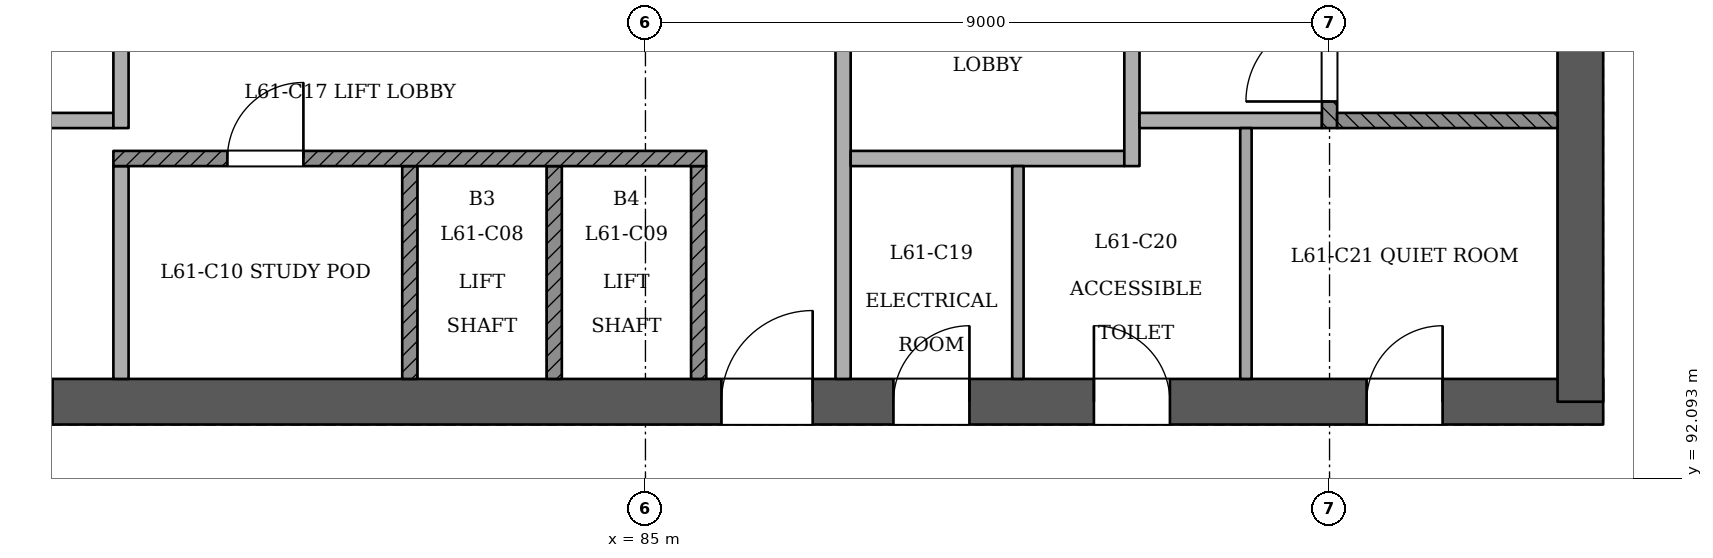
"""IFC4 building model, lengths in metres.
Left out: names, types, materials, properties, quantities, classifications, styles, units other than length and angle.
Written with IfcOpenShell. Run it as: python <this file> out.ifc"""

import sys

from ifc_helpers import new_model, si_unit, direction, frame, frame_2d, origin, place, context, subcontext, project, spatial, rectangle, extrude, element, fill, save


model = new_model("IFC4")
c1 = context("Model", 3, precision=1e-05, world=origin(), true_north=direction((0.0, 1.0)))
c2 = subcontext(c1, "Body", "Model", "MODEL_VIEW")
j1 = project(units=[si_unit("LENGTHUNIT", "METRE"), si_unit("PLANEANGLEUNIT", "RADIAN")], contexts=[c1])
p1 = place(None, origin())
s1 = spatial("IfcSite", under=j1, at=p1, CompositionType="ELEMENT")
p2 = place(p1, origin())
s2 = spatial("IfcBuilding", under=s1, at=p2, CompositionType="ELEMENT")
p3 = place(p2, frame((0.0, 0.0, 239.2)))
s3 = spatial("IfcBuildingStorey", under=s2, at=p3, CompositionType="ELEMENT", Elevation=239.2)
p4 = place(p3, frame((72.7, 93.1, 0.0), z_axis=(0.0, 0.0, 1.0), x_axis=(1.0, 0.0, 0.0)))
e1 = element("IfcWall", 1, at=p4, inside=s3, PredefinedType="SHEAR", context=c2, shape_type="SweptSolid", body=[
    extrude(rectangle(XDim=24.9, YDim=0.6, at=frame_2d((12.45, 0.0))), origin(), (0.0, 0.0, 1.0), 3.6),
])
p5 = place(p4, frame((1.1, 0.0, 0.0)))
e2 = element("IfcOpeningElement", 2, at=p5, cuts=e1, PredefinedType="OPENING", context=c2, shape_type="SweptSolid", body=[
    extrude(rectangle(XDim=1.2, YDim=2.1, at=frame_2d((0.6, 1.05))), frame((0.0, 0.311, 0.0), z_axis=(0.0, -1.0, 0.0), x_axis=(1.0, 0.0, 0.0)), (0.0, 0.0, 1.0), 0.621),
])
p6 = place(p4, frame((3.3, 0.0, 0.0)))
e3 = element("IfcOpeningElement", 3, at=p6, cuts=e1, PredefinedType="OPENING", context=c2, shape_type="SweptSolid", body=[
    extrude(rectangle(XDim=1.2, YDim=2.1, at=frame_2d((0.6, 1.05))), frame((0.0, 0.311, 0.0), z_axis=(0.0, -1.0, 0.0), x_axis=(1.0, 0.0, 0.0)), (0.0, 0.0, 1.0), 0.621),
])
p7 = place(p4, frame((13.3, 0.0, 0.0)))
e4 = element("IfcOpeningElement", 4, at=p7, cuts=e1, PredefinedType="OPENING", context=c2, shape_type="SweptSolid", body=[
    extrude(rectangle(XDim=1.2, YDim=2.1, at=frame_2d((0.6, 1.05))), frame((0.0, 0.311, 0.0), z_axis=(0.0, -1.0, 0.0), x_axis=(1.0, 0.0, 0.0)), (0.0, 0.0, 1.0), 0.621),
])
p8 = place(p4, frame((15.562, 0.0, 0.0)))
e5 = element("IfcOpeningElement", 5, at=p8, cuts=e1, PredefinedType="OPENING", context=c2, shape_type="SweptSolid", body=[
    extrude(rectangle(XDim=1.0, YDim=2.1, at=frame_2d((0.5, 1.05))), frame((0.0, 0.311, 0.0), z_axis=(0.0, -1.0, 0.0), x_axis=(1.0, 0.0, 0.0)), (0.0, 0.0, 1.0), 0.621),
])
p9 = place(p4, frame((18.2, 0.0, 0.0)))
e6 = element("IfcOpeningElement", 6, at=p9, cuts=e1, PredefinedType="OPENING", context=c2, shape_type="SweptSolid", body=[
    extrude(rectangle(XDim=1.0, YDim=2.1, at=frame_2d((0.5, 1.05))), frame((0.0, 0.311, 0.0), z_axis=(0.0, -1.0, 0.0), x_axis=(1.0, 0.0, 0.0)), (0.0, 0.0, 1.0), 0.621),
])
p10 = place(p4, frame((21.788, 0.0, 0.0)))
e7 = element("IfcOpeningElement", 7, at=p10, cuts=e1, PredefinedType="OPENING", context=c2, shape_type="SweptSolid", body=[
    extrude(rectangle(XDim=1.0, YDim=2.1, at=frame_2d((0.5, 1.05))), frame((0.0, 0.311, 0.0), z_axis=(0.0, -1.0, 0.0), x_axis=(1.0, 0.0, 0.0)), (0.0, 0.0, 1.0), 0.621),
])
p11 = place(p3, frame((97.3, 93.1, 0.0), z_axis=(0.0, 0.0, 1.0), x_axis=(0.0, 1.0, 0.0)))
e8 = element("IfcWall", 8, at=p11, inside=s3, PredefinedType="SHEAR", context=c2, shape_type="SweptSolid", body=[
    extrude(rectangle(XDim=10.9, YDim=0.6, at=frame_2d((5.45, 0.0))), origin(), (0.0, 0.0, 1.0), 3.6),
])
p12 = place(p3, frame((78.1, 93.4, 0.0), z_axis=(0.0, 0.0, 1.0), x_axis=(0.0, 1.0, 0.0)))
e9 = element("IfcWall", 9, at=p12, inside=s3, PredefinedType="PARTITIONING", context=c2, shape_type="SweptSolid", body=[
    extrude(rectangle(XDim=2.8, YDim=0.2, at=frame_2d((1.4, 0.0))), origin(), (0.0, 0.0, 1.0), 3.2),
])
for number, where, z_axis, x_axis in (
    (10, (81.9, 93.4, 0.0), (0.0, 0.0, 1.0), (0.0, 1.0, 0.0)),
    (11, (83.8, 93.4, 0.0), (0.0, 0.0, 1.0), (0.0, 1.0, 0.0)),
    (12, (85.7, 93.4, 0.0), (0.0, 0.0, 1.0), (0.0, 1.0, 0.0)),
):
    element("IfcWall", number, at=place(p3, frame(where, z_axis=z_axis, x_axis=x_axis)), inside=s3, PredefinedType="SOLIDWALL", context=c2, shape_type="SweptSolid", body=[
        extrude(rectangle(XDim=2.8, YDim=0.2, at=frame_2d((1.4, 0.0))), origin(), (0.0, 0.0, 1.0), 3.2),
    ])
p13 = place(p3, frame((87.6, 93.4, 0.0), z_axis=(0.0, 0.0, 1.0), x_axis=(0.0, 1.0, 0.0)))
e13 = element("IfcWall", 13, at=p13, inside=s3, PredefinedType="PARTITIONING", context=c2, shape_type="SweptSolid", body=[
    extrude(rectangle(XDim=7.0, YDim=0.2, at=frame_2d((3.5, 0.0))), origin(), (0.0, 0.0, 1.0), 3.2),
])
p14 = place(p13, frame((4.45, 0.0, 0.0)))
e14 = element("IfcOpeningElement", 14, at=p14, cuts=e13, PredefinedType="OPENING", context=c2, shape_type="SweptSolid", body=[
    extrude(rectangle(XDim=1.1, YDim=2.1, at=frame_2d((0.55, 1.05))), frame((0.0, 0.11, 0.0), z_axis=(0.0, -1.0, 0.0), x_axis=(1.0, 0.0, 0.0)), (0.0, 0.0, 1.0), 0.221),
])
p15 = place(p3, frame((89.9, 93.4, 0.0), z_axis=(0.0, 0.0, 1.0), x_axis=(0.0, 1.0, 0.0)))
e15 = element("IfcWall", 15, at=p15, inside=s3, PredefinedType="PARTITIONING", context=c2, shape_type="SweptSolid", body=[
    extrude(rectangle(XDim=2.8, YDim=0.15, at=frame_2d((1.4, 0.0))), origin(), (0.0, 0.0, 1.0), 3.2),
])
p16 = place(p3, frame((92.9, 93.4, 0.0), z_axis=(0.0, 0.0, 1.0), x_axis=(0.0, 1.0, 0.0)))
e16 = element("IfcWall", 16, at=p16, inside=s3, PredefinedType="PARTITIONING", context=c2, shape_type="SweptSolid", body=[
    extrude(rectangle(XDim=3.3, YDim=0.15, at=frame_2d((1.65, 0.0))), origin(), (0.0, 0.0, 1.0), 3.2),
])
p17 = place(p3, frame((78.0, 96.3, 0.0), z_axis=(0.0, 0.0, 1.0), x_axis=(1.0, 0.0, 0.0)))
e17 = element("IfcWall", 17, at=p17, inside=s3, PredefinedType="SOLIDWALL", context=c2, shape_type="SweptSolid", body=[
    extrude(rectangle(XDim=7.8, YDim=0.2, at=frame_2d((3.9, 0.0))), origin(), (0.0, 0.0, 1.0), 3.2),
])
p18 = place(p17, frame((1.5, 0.0, 0.0)))
e18 = element("IfcOpeningElement", 18, at=p18, cuts=e17, PredefinedType="OPENING", context=c2, shape_type="SweptSolid", body=[
    extrude(rectangle(XDim=1.0, YDim=2.1, at=frame_2d((0.5, 1.05))), frame((0.0, 0.11, 0.0), z_axis=(0.0, -1.0, 0.0), x_axis=(1.0, 0.0, 0.0)), (0.0, 0.0, 1.0), 0.221),
])
p19 = place(p3, frame((87.7, 96.3, 0.0), z_axis=(0.0, 0.0, 1.0), x_axis=(1.0, 0.0, 0.0)))
e19 = element("IfcWall", 19, at=p19, inside=s3, PredefinedType="PARTITIONING", context=c2, shape_type="SweptSolid", body=[
    extrude(rectangle(XDim=3.6, YDim=0.2, at=frame_2d((1.8, 0.0))), origin(), (0.0, 0.0, 1.0), 3.2),
])
p20 = place(p3, frame((91.4, 96.2, 0.0), z_axis=(0.0, 0.0, 1.0), x_axis=(0.0, 1.0, 0.0)))
e20 = element("IfcWall", 20, at=p20, inside=s3, PredefinedType="PARTITIONING", context=c2, shape_type="SweptSolid", body=[
    extrude(rectangle(XDim=4.2, YDim=0.2, at=frame_2d((2.1, 0.0))), origin(), (0.0, 0.0, 1.0), 3.2),
])
p21 = place(p20, frame((2.45, 0.0, 0.0)))
e21 = element("IfcOpeningElement", 21, at=p21, cuts=e20, PredefinedType="OPENING", context=c2, shape_type="SweptSolid", body=[
    extrude(rectangle(XDim=1.1, YDim=2.1, at=frame_2d((0.55, 1.05))), frame((0.0, 0.11, 0.0), z_axis=(0.0, -1.0, 0.0), x_axis=(1.0, 0.0, 0.0)), (0.0, 0.0, 1.0), 0.221),
])
p22 = place(p3, frame((76.1, 96.8, 0.0), z_axis=(0.0, 0.0, 1.0), x_axis=(1.0, 0.0, 0.0)))
e22 = element("IfcWall", 22, at=p22, inside=s3, PredefinedType="PARTITIONING", context=c2, shape_type="SweptSolid", body=[
    extrude(rectangle(XDim=1.9, YDim=0.2, at=frame_2d((0.95, 0.0))), origin(), (0.0, 0.0, 1.0), 3.2),
])
p23 = place(p3, frame((78.1, 96.7, 0.0), z_axis=(0.0, 0.0, 1.0), x_axis=(0.0, 1.0, 0.0)))
e23 = element("IfcWall", 23, at=p23, inside=s3, PredefinedType="PARTITIONING", context=c2, shape_type="SweptSolid", body=[
    extrude(rectangle(XDim=3.7, YDim=0.2, at=frame_2d((1.85, 0.0))), origin(), (0.0, 0.0, 1.0), 3.2),
])
p24 = place(p23, frame((1.95, 0.0, 0.0)))
e24 = element("IfcOpeningElement", 24, at=p24, cuts=e23, PredefinedType="OPENING", context=c2, shape_type="SweptSolid", body=[
    extrude(rectangle(XDim=1.1, YDim=2.1, at=frame_2d((0.55, 1.05))), frame((0.0, 0.11, 0.0), z_axis=(0.0, -1.0, 0.0), x_axis=(1.0, 0.0, 0.0)), (0.0, 0.0, 1.0), 0.221),
])
p25 = place(p3, frame((91.5, 96.8, 0.0), z_axis=(0.0, 0.0, 1.0), x_axis=(1.0, 0.0, 0.0)))
e25 = element("IfcWall", 25, at=p25, inside=s3, PredefinedType="PARTITIONING", context=c2, shape_type="SweptSolid", body=[
    extrude(rectangle(XDim=2.4, YDim=0.2, at=frame_2d((1.2, 0.0))), origin(), (0.0, 0.0, 1.0), 3.2),
])
p26 = place(p3, frame((94.0, 96.7, 0.0), z_axis=(0.0, 0.0, 1.0), x_axis=(0.0, 1.0, 0.0)))
e26 = element("IfcWall", 26, at=p26, inside=s3, PredefinedType="SOLIDWALL", context=c2, shape_type="SweptSolid", body=[
    extrude(rectangle(XDim=3.7, YDim=0.2, at=frame_2d((1.85, 0.0))), origin(), (0.0, 0.0, 1.0), 3.2),
])
p27 = place(p26, frame((0.35, 0.0, 0.0)))
e27 = element("IfcOpeningElement", 27, at=p27, cuts=e26, PredefinedType="OPENING", context=c2, shape_type="SweptSolid", body=[
    extrude(rectangle(XDim=1.1, YDim=2.1, at=frame_2d((0.55, 1.05))), frame((0.0, 0.11, 0.0), z_axis=(0.0, -1.0, 0.0), x_axis=(1.0, 0.0, 0.0)), (0.0, 0.0, 1.0), 0.221),
])
p28 = place(p3, frame((94.1, 96.8, 0.0), z_axis=(0.0, 0.0, 1.0), x_axis=(1.0, 0.0, 0.0)))
e28 = element("IfcWall", 28, at=p28, inside=s3, PredefinedType="SOLIDWALL", context=c2, shape_type="SweptSolid", body=[
    extrude(rectangle(XDim=2.9, YDim=0.2, at=frame_2d((1.45, 0.0))), origin(), (0.0, 0.0, 1.0), 3.2),
])
p29 = place(p27, origin())
e29 = element("IfcDoor", 29, at=p29, inside=s3, OperationType="SINGLE_SWING_LEFT", PredefinedType="NOTDEFINED", context=c2, shape_type="SweptSolid", body=[
    extrude(rectangle(XDim=1.1, YDim=2.1, at=frame_2d((0.55, 1.05))), frame((0.0, 0.025, 0.0), z_axis=(0.0, -1.0, 0.0), x_axis=(1.0, 0.0, 0.0)), (0.0, 0.0, 1.0), 0.05),
])
fill(e27, e29)
p30 = place(p6, origin())
e30 = element("IfcDoor", 30, at=p30, inside=s3, OperationType="SINGLE_SWING_LEFT", PredefinedType="NOTDEFINED", context=c2, shape_type="SweptSolid", body=[
    extrude(rectangle(XDim=1.2, YDim=2.1, at=frame_2d((0.6, 1.05))), frame((0.0, 0.025, 0.0), z_axis=(0.0, -1.0, 0.0), x_axis=(1.0, 0.0, 0.0)), (0.0, 0.0, 1.0), 0.05),
])
fill(e3, e30)
p31 = place(p7, origin())
e31 = element("IfcDoor", 31, at=p31, inside=s3, OperationType="SINGLE_SWING_RIGHT", PredefinedType="NOTDEFINED", context=c2, shape_type="SweptSolid", body=[
    extrude(rectangle(XDim=1.2, YDim=2.1, at=frame_2d((0.6, 1.05))), frame((0.0, 0.025, 0.0), z_axis=(0.0, -1.0, 0.0), x_axis=(1.0, 0.0, 0.0)), (0.0, 0.0, 1.0), 0.05),
])
fill(e4, e31)
p32 = place(p8, origin())
e32 = element("IfcDoor", 32, at=p32, inside=s3, OperationType="SINGLE_SWING_RIGHT", PredefinedType="NOTDEFINED", context=c2, shape_type="SweptSolid", body=[
    extrude(rectangle(XDim=1.0, YDim=2.1, at=frame_2d((0.5, 1.05))), frame((0.0, 0.025, 0.0), z_axis=(0.0, -1.0, 0.0), x_axis=(1.0, 0.0, 0.0)), (0.0, 0.0, 1.0), 0.05),
])
fill(e5, e32)
p33 = place(p9, origin())
e33 = element("IfcDoor", 33, at=p33, inside=s3, OperationType="SINGLE_SWING_LEFT", PredefinedType="NOTDEFINED", context=c2, shape_type="SweptSolid", body=[
    extrude(rectangle(XDim=1.0, YDim=2.1, at=frame_2d((0.5, 1.05))), frame((0.0, 0.025, 0.0), z_axis=(0.0, -1.0, 0.0), x_axis=(1.0, 0.0, 0.0)), (0.0, 0.0, 1.0), 0.05),
])
fill(e6, e33)
p34 = place(p10, origin())
e34 = element("IfcDoor", 34, at=p34, inside=s3, OperationType="SINGLE_SWING_RIGHT", PredefinedType="NOTDEFINED", context=c2, shape_type="SweptSolid", body=[
    extrude(rectangle(XDim=1.0, YDim=2.1, at=frame_2d((0.5, 1.05))), frame((0.0, 0.025, 0.0), z_axis=(0.0, -1.0, 0.0), x_axis=(1.0, 0.0, 0.0)), (0.0, 0.0, 1.0), 0.05),
])
fill(e7, e34)
p35 = place(p18, origin())
e35 = element("IfcDoor", 35, at=p35, inside=s3, OperationType="SINGLE_SWING_RIGHT", PredefinedType="NOTDEFINED", context=c2, shape_type="SweptSolid", body=[
    extrude(rectangle(XDim=1.0, YDim=2.1, at=frame_2d((0.5, 1.05))), frame((0.0, 0.025, 0.0), z_axis=(0.0, -1.0, 0.0), x_axis=(1.0, 0.0, 0.0)), (0.0, 0.0, 1.0), 0.05),
])
fill(e18, e35)
save(model, sys.argv[1])
